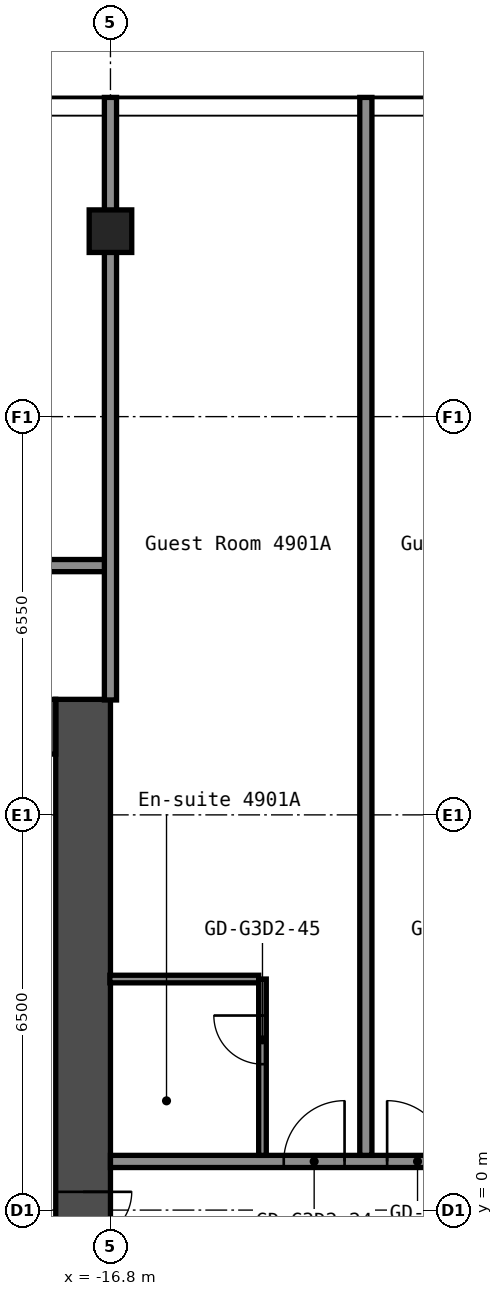
"""IFC4 building model, lengths in metres.
Left out: names, types, materials, properties, quantities, classifications, styles, units other than length and angle.
Written with IfcOpenShell. Run it as: python <this file> out.ifc"""

import sys

from ifc_helpers import new_model, si_unit, direction, frame, frame_2d, origin, origin_2d, place, context, subcontext, project, spatial, rectangle, hollow_rectangle, extrude, element, fill, save


model = new_model("IFC4")
c1 = context("Model", 3, precision=1e-05, world=origin(), true_north=direction((0.0, 1.0)))
c2 = subcontext(c1, "Body", "Model", "MODEL_VIEW")
j1 = project(units=[si_unit("LENGTHUNIT", "METRE"), si_unit("PLANEANGLEUNIT", "RADIAN")], contexts=[c1])
p1 = place(None, origin())
s1 = spatial("IfcSite", under=j1, at=p1, CompositionType="ELEMENT")
p2 = place(p1, origin())
s2 = spatial("IfcBuilding", under=s1, at=p2, CompositionType="ELEMENT")
p3 = place(p2, frame((0.0, 0.0, 172.6)))
s3 = spatial("IfcBuildingStorey", under=s2, at=p3, CompositionType="ELEMENT", Elevation=172.6)
p4 = place(p3, frame((-16.8, 16.1, 0.0), z_axis=(0.0, 0.0, 1.0), x_axis=(1.0, 0.0, 0.0)))
e1 = element("IfcColumn", 1, at=p4, inside=s3, PredefinedType="COLUMN", context=c2, shape_type="SweptSolid", body=[
    extrude(hollow_rectangle(XDim=0.7, YDim=0.7, WallThickness=0.028, at=origin_2d()), origin(), (0.0, 0.0, 1.0), 2.9),
])
p5 = place(p3, frame((-17.25, -8.4, 0.0), z_axis=(0.0, 0.0, 1.0), x_axis=(0.0, 1.0, 0.0)))
e2 = element("IfcWall", 2, at=p5, inside=s3, PredefinedType="SHEAR", context=c2, shape_type="SweptSolid", body=[
    extrude(rectangle(XDim=16.8, YDim=0.9, at=frame_2d((8.4, 0.0))), origin(), (0.0, 0.0, 1.0), 2.9),
])
p6 = place(p5, frame((7.1, 0.0, 0.0)))
e3 = element("IfcOpeningElement", 3, at=p6, cuts=e2, PredefinedType="OPENING", context=c2, shape_type="SweptSolid", body=[
    extrude(rectangle(XDim=1.6, YDim=2.1, at=frame_2d((0.8, 1.05))), frame((0.0, 0.46, 0.0), z_axis=(0.0, -1.0, 0.0), x_axis=(1.0, 0.0, 0.0)), (0.0, 0.0, 1.0), 0.92),
])
p7 = place(p3, frame((-32.7, 7.95, 0.0), z_axis=(0.0, 0.0, 1.0), x_axis=(1.0, 0.0, 0.0)))
e4 = element("IfcWall", 4, at=p7, inside=s3, PredefinedType="SHEAR", context=c2, shape_type="SweptSolid", body=[
    extrude(rectangle(XDim=15.0, YDim=0.9, at=frame_2d((7.5, 0.0))), origin(), (0.0, 0.0, 1.0), 2.9),
])
p8 = place(p7, frame((3.4, 0.0, 0.0)))
e5 = element("IfcOpeningElement", 5, at=p8, cuts=e4, PredefinedType="OPENING", context=c2, shape_type="SweptSolid", body=[
    extrude(rectangle(XDim=1.2, YDim=2.1, at=frame_2d((0.6, 1.05))), frame((0.0, 0.46, 0.0), z_axis=(0.0, -1.0, 0.0), x_axis=(1.0, 0.0, 0.0)), (0.0, 0.0, 1.0), 0.92),
])
p9 = place(p7, frame((0.75, 0.0, 0.0)))
e6 = element("IfcOpeningElement", 6, at=p9, cuts=e4, PredefinedType="OPENING", context=c2, shape_type="SweptSolid", body=[
    extrude(rectangle(XDim=0.9, YDim=2.1, at=frame_2d((0.45, 1.05))), frame((0.0, 0.46, 0.0), z_axis=(0.0, -1.0, 0.0), x_axis=(1.0, 0.0, 0.0)), (0.0, 0.0, 1.0), 0.92),
])
p10 = place(p3, frame((-16.8, 0.8, 0.0), z_axis=(0.0, 0.0, 1.0), x_axis=(1.0, 0.0, 0.0)))
e7 = element("IfcWall", 7, at=p10, inside=s3, PredefinedType="PARTITIONING", context=c2, shape_type="SweptSolid", body=[
    extrude(rectangle(XDim=33.6, YDim=0.2, at=frame_2d((16.8, 0.0))), origin(), (0.0, 0.0, 1.0), 2.9),
])
p11 = place(p10, frame((2.85, 0.0, 0.0)))
e8 = element("IfcOpeningElement", 8, at=p11, cuts=e7, PredefinedType="OPENING", context=c2, shape_type="SweptSolid", body=[
    extrude(rectangle(XDim=1.0, YDim=2.1, at=frame_2d((0.5, 1.05))), frame((0.0, 0.11, 0.0), z_axis=(0.0, -1.0, 0.0), x_axis=(1.0, 0.0, 0.0)), (0.0, 0.0, 1.0), 0.22),
])
p12 = place(p10, frame((4.55, 0.0, 0.0)))
e9 = element("IfcOpeningElement", 9, at=p12, cuts=e7, PredefinedType="OPENING", context=c2, shape_type="SweptSolid", body=[
    extrude(rectangle(XDim=1.0, YDim=2.1, at=frame_2d((0.5, 1.05))), frame((0.0, 0.11, 0.0), z_axis=(0.0, -1.0, 0.0), x_axis=(1.0, 0.0, 0.0)), (0.0, 0.0, 1.0), 0.22),
])
p13 = place(p10, frame((13.8, 0.0, 0.0)))
e10 = element("IfcOpeningElement", 10, at=p13, cuts=e7, PredefinedType="OPENING", context=c2, shape_type="SweptSolid", body=[
    extrude(rectangle(XDim=1.0, YDim=2.1, at=frame_2d((0.5, 1.05))), frame((0.0, 0.11, 0.0), z_axis=(0.0, -1.0, 0.0), x_axis=(1.0, 0.0, 0.0)), (0.0, 0.0, 1.0), 0.22),
])
p14 = place(p10, frame((19.65, 0.0, 0.0)))
e11 = element("IfcOpeningElement", 11, at=p14, cuts=e7, PredefinedType="OPENING", context=c2, shape_type="SweptSolid", body=[
    extrude(rectangle(XDim=1.0, YDim=2.1, at=frame_2d((0.5, 1.05))), frame((0.0, 0.11, 0.0), z_axis=(0.0, -1.0, 0.0), x_axis=(1.0, 0.0, 0.0)), (0.0, 0.0, 1.0), 0.22),
])
p15 = place(p10, frame((21.35, 0.0, 0.0)))
e12 = element("IfcOpeningElement", 12, at=p15, cuts=e7, PredefinedType="OPENING", context=c2, shape_type="SweptSolid", body=[
    extrude(rectangle(XDim=1.0, YDim=2.1, at=frame_2d((0.5, 1.05))), frame((0.0, 0.11, 0.0), z_axis=(0.0, -1.0, 0.0), x_axis=(1.0, 0.0, 0.0)), (0.0, 0.0, 1.0), 0.22),
])
p16 = place(p10, frame((27.1, 0.0, 0.0)))
e13 = element("IfcOpeningElement", 13, at=p16, cuts=e7, PredefinedType="OPENING", context=c2, shape_type="SweptSolid", body=[
    extrude(rectangle(XDim=1.0, YDim=2.1, at=frame_2d((0.5, 1.05))), frame((0.0, 0.11, 0.0), z_axis=(0.0, -1.0, 0.0), x_axis=(1.0, 0.0, 0.0)), (0.0, 0.0, 1.0), 0.22),
])
p17 = place(p3, frame((-16.81, 3.8, 0.0), z_axis=(0.0, 0.0, 1.0), x_axis=(1.0, 0.0, 0.0)))
e14 = element("IfcWall", 14, at=p17, inside=s3, PredefinedType="PARTITIONING", context=c2, shape_type="SweptSolid", body=[
    extrude(rectangle(XDim=2.448, YDim=0.125, at=frame_2d((1.224, 0.0))), origin(), (0.0, 0.0, 1.0), 2.9),
])
p18 = place(p3, frame((-42.7, 10.6, 0.0), z_axis=(0.0, 0.0, 1.0), x_axis=(1.0, 0.0, 0.0)))
e15 = element("IfcWall", 15, at=p18, inside=s3, PredefinedType="PARTITIONING", context=c2, shape_type="SweptSolid", body=[
    extrude(rectangle(XDim=25.9, YDim=0.2, at=frame_2d((12.95, 0.0))), origin(), (0.0, 0.0, 1.0), 2.9),
])
p19 = place(p18, frame((1.61, 0.0, 0.0)))
e16 = element("IfcOpeningElement", 16, at=p19, cuts=e15, PredefinedType="OPENING", context=c2, shape_type="SweptSolid", body=[
    extrude(rectangle(XDim=0.9, YDim=2.1, at=frame_2d((0.45, 1.05))), frame((0.0, 0.11, 0.0), z_axis=(0.0, -1.0, 0.0), x_axis=(1.0, 0.0, 0.0)), (0.0, 0.0, 1.0), 0.22),
])
p20 = place(p18, frame((6.01, 0.0, 0.0)))
e17 = element("IfcOpeningElement", 17, at=p20, cuts=e15, PredefinedType="OPENING", context=c2, shape_type="SweptSolid", body=[
    extrude(rectangle(XDim=0.9, YDim=2.1, at=frame_2d((0.45, 1.05))), frame((0.0, 0.11, 0.0), z_axis=(0.0, -1.0, 0.0), x_axis=(1.0, 0.0, 0.0)), (0.0, 0.0, 1.0), 0.22),
])
p21 = place(p18, frame((12.8, 0.0, 0.0)))
e18 = element("IfcOpeningElement", 18, at=p21, cuts=e15, PredefinedType="OPENING", context=c2, shape_type="SweptSolid", body=[
    extrude(rectangle(XDim=1.0, YDim=2.1, at=frame_2d((0.5, 1.05))), frame((0.0, 0.11, 0.0), z_axis=(0.0, -1.0, 0.0), x_axis=(1.0, 0.0, 0.0)), (0.0, 0.0, 1.0), 0.22),
])
p22 = place(p18, frame((21.2, 0.0, 0.0)))
e19 = element("IfcOpeningElement", 19, at=p22, cuts=e15, PredefinedType="OPENING", context=c2, shape_type="SweptSolid", body=[
    extrude(rectangle(XDim=1.0, YDim=2.1, at=frame_2d((0.5, 1.05))), frame((0.0, 0.11, 0.0), z_axis=(0.0, -1.0, 0.0), x_axis=(1.0, 0.0, 0.0)), (0.0, 0.0, 1.0), 0.22),
])
p23 = place(p3, frame((-16.8, 8.39, 0.0), z_axis=(0.0, 0.0, 1.0), x_axis=(0.0, 1.0, 0.0)))
e20 = element("IfcWall", 20, at=p23, inside=s3, PredefinedType="PARTITIONING", context=c2, shape_type="SweptSolid", body=[
    extrude(rectangle(XDim=9.91, YDim=0.2, at=frame_2d((4.955, 0.0))), origin(), (0.0, 0.0, 1.0), 2.9),
])
p24 = place(p3, frame((-14.3, 0.9, 0.0), z_axis=(0.0, 0.0, 1.0), x_axis=(0.0, 1.0, 0.0)))
e21 = element("IfcWall", 21, at=p24, inside=s3, PredefinedType="PARTITIONING", context=c2, shape_type="SweptSolid", body=[
    extrude(rectangle(XDim=2.9, YDim=0.125, at=frame_2d((1.45, 0.0))), origin(), (0.0, 0.0, 1.0), 2.9),
])
p25 = place(p24, frame((1.5, 0.0, 0.0)))
e22 = element("IfcOpeningElement", 22, at=p25, cuts=e21, PredefinedType="OPENING", context=c2, shape_type="SweptSolid", body=[
    extrude(rectangle(XDim=0.8, YDim=2.1, at=frame_2d((0.4, 1.05))), frame((0.0, 0.073, 0.0), z_axis=(0.0, -1.0, 0.0), x_axis=(1.0, 0.0, 0.0)), (0.0, 0.0, 1.0), 0.145),
])
p26 = place(p3, frame((-12.6, 0.9, 0.0), z_axis=(0.0, 0.0, 1.0), x_axis=(0.0, 1.0, 0.0)))
e23 = element("IfcWall", 23, at=p26, inside=s3, PredefinedType="PARTITIONING", context=c2, shape_type="SweptSolid", body=[
    extrude(rectangle(XDim=17.4, YDim=0.2, at=frame_2d((8.7, 0.0))), origin(), (0.0, 0.0, 1.0), 2.9),
])
p27 = place(p6, origin())
e24 = element("IfcDoor", 24, at=p27, inside=s3, OperationType="DOUBLE_DOOR_SINGLE_SWING", PredefinedType="DOOR", context=c2, shape_type="SweptSolid", body=[
    extrude(rectangle(XDim=1.6, YDim=2.1, at=frame_2d((0.8, 1.05))), frame((0.0, 0.025, 0.0), z_axis=(0.0, -1.0, 0.0), x_axis=(1.0, 0.0, 0.0)), (0.0, 0.0, 1.0), 0.05),
])
fill(e3, e24)
p28 = place(p11, origin())
e25 = element("IfcDoor", 25, at=p28, inside=s3, OperationType="SINGLE_SWING_LEFT", PredefinedType="DOOR", context=c2, shape_type="SweptSolid", body=[
    extrude(rectangle(XDim=1.0, YDim=2.1, at=frame_2d((0.5, 1.05))), frame((0.0, 0.025, 0.0), z_axis=(0.0, -1.0, 0.0), x_axis=(1.0, 0.0, 0.0)), (0.0, 0.0, 1.0), 0.05),
])
fill(e8, e25)
p29 = place(p12, origin())
e26 = element("IfcDoor", 26, at=p29, inside=s3, OperationType="SINGLE_SWING_RIGHT", PredefinedType="DOOR", context=c2, shape_type="SweptSolid", body=[
    extrude(rectangle(XDim=1.0, YDim=2.1, at=frame_2d((0.5, 1.05))), frame((0.0, 0.025, 0.0), z_axis=(0.0, -1.0, 0.0), x_axis=(1.0, 0.0, 0.0)), (0.0, 0.0, 1.0), 0.05),
])
fill(e9, e26)
p30 = place(p25, origin())
e27 = element("IfcDoor", 27, at=p30, inside=s3, OperationType="SINGLE_SWING_LEFT", PredefinedType="DOOR", context=c2, shape_type="SweptSolid", body=[
    extrude(rectangle(XDim=0.8, YDim=2.1, at=frame_2d((0.4, 1.05))), frame((0.0, 0.025, 0.0), z_axis=(0.0, -1.0, 0.0), x_axis=(1.0, 0.0, 0.0)), (0.0, 0.0, 1.0), 0.05),
])
fill(e22, e27)
save(model, sys.argv[1])
